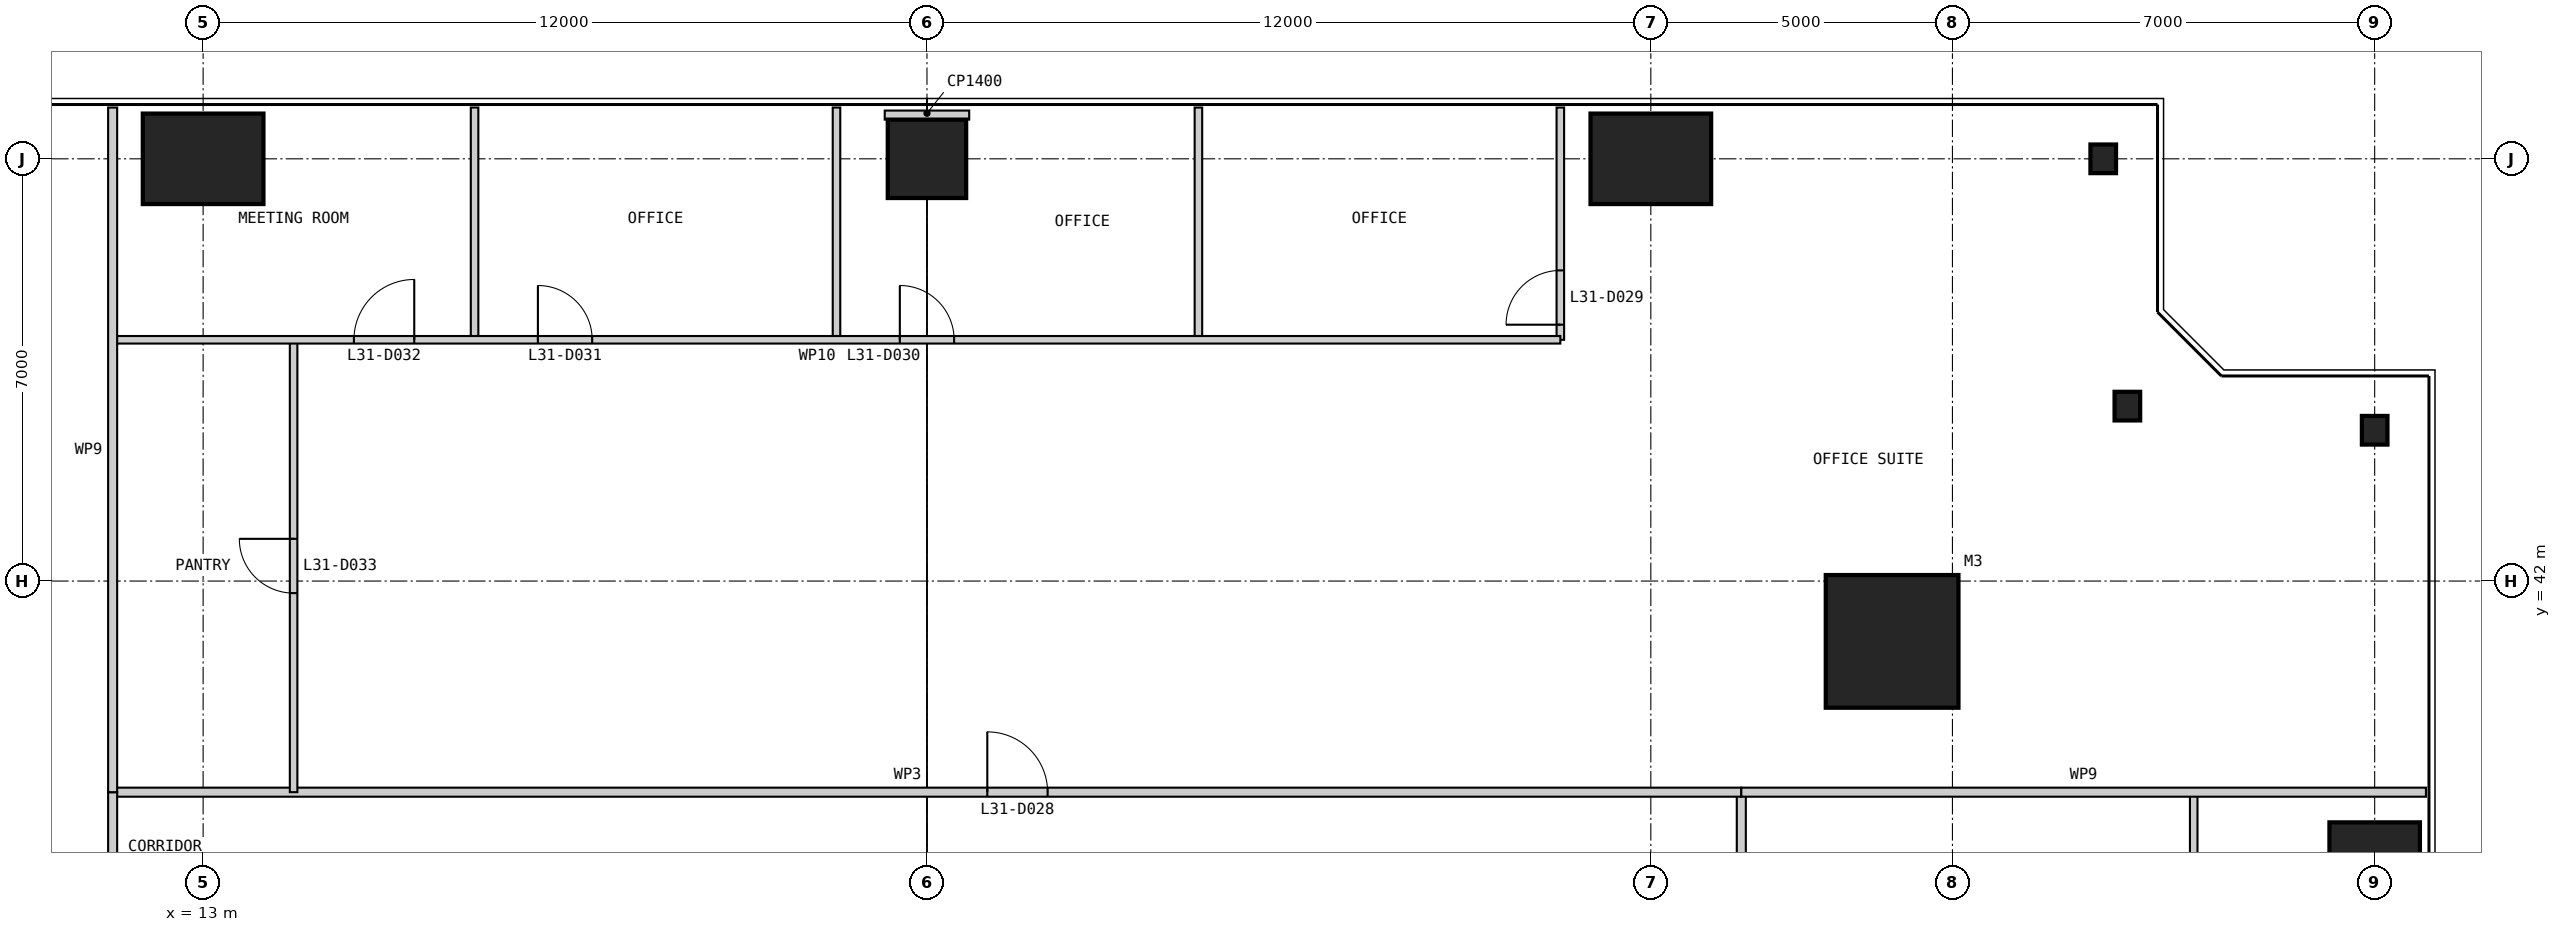
"""IFC4 building model, lengths in metres.
Left out: names, types, materials, properties, quantities, classifications, styles, units other than length and angle.
Written with IfcOpenShell. Run it as: python <this file> out.ifc"""

import sys

from ifc_helpers import new_model, si_unit, direction, frame, frame_2d, origin, origin_2d, place, context, subcontext, project, spatial, rectangle, i_section, extrude, element, fill, save


model = new_model("IFC4")
c1 = context("Model", 3, precision=1e-05, world=origin(), true_north=direction((0.0, 1.0)))
c2 = subcontext(c1, "Body", "Model", "MODEL_VIEW")
j1 = project(units=[si_unit("LENGTHUNIT", "METRE"), si_unit("PLANEANGLEUNIT", "RADIAN")], contexts=[c1])
p1 = place(None, origin())
s1 = spatial("IfcSite", under=j1, at=p1, CompositionType="ELEMENT")
p2 = place(p1, origin())
s2 = spatial("IfcBuilding", under=s1, at=p2, CompositionType="ELEMENT")
p3 = place(p2, frame((0.0, 0.0, 134.4)))
s3 = spatial("IfcBuildingStorey", under=s2, at=p3, CompositionType="ELEMENT", Elevation=134.4)
p4 = place(p3, frame((41.0, 41.0, 0.0), z_axis=(0.0, 0.0, 1.0), x_axis=(1.0, 0.0, 0.0)))
e1 = element("IfcColumn", 1, at=p4, inside=s3, PredefinedType="COLUMN", context=c2, shape_type="SweptSolid", body=[
    extrude(rectangle(XDim=2.2, YDim=2.2, at=origin_2d()), origin(), (0.0, 0.0, 1.0), 4.0),
])
p5 = place(p3, frame((49.0, 37.0, 0.0), z_axis=(0.0, 0.0, 1.0), x_axis=(1.0, 0.0, 0.0)))
e2 = element("IfcColumn", 2, at=p5, inside=s3, PredefinedType="COLUMN", context=c2, shape_type="SweptSolid", body=[
    extrude(rectangle(XDim=1.5, YDim=2.0, at=origin_2d()), origin(), (0.0, 0.0, 1.0), 4.0),
])
for number, where, z_axis, x_axis in (
    (3, (49.0, 44.5, 0.0), (0.0, 0.0, 1.0), (1.0, 0.0, 0.0)),
    (4, (44.9, 44.9, 0.0), (0.0, 0.0, 1.0), (1.0, 0.0, 0.0)),
    (5, (44.5, 49.0, 0.0), (0.0, 0.0, 1.0), (1.0, 0.0, 0.0)),
):
    element("IfcColumn", number, at=place(p3, frame(where, z_axis=z_axis, x_axis=x_axis)), inside=s3, PredefinedType="COLUMN", context=c2, shape_type="SweptSolid", body=[
        extrude(i_section(OverallWidth=0.424, OverallDepth=0.475, WebThickness=0.048, FlangeThickness=0.077, at=origin_2d()), origin(), (0.0, 0.0, 1.0), 4.0),
    ])
p6 = place(p3, frame((37.0, 49.0, 0.0), z_axis=(0.0, 0.0, 1.0), x_axis=(1.0, 0.0, 0.0)))
e6 = element("IfcColumn", 6, at=p6, inside=s3, PredefinedType="COLUMN", context=c2, shape_type="SweptSolid", body=[
    extrude(rectangle(XDim=2.0, YDim=1.5, at=origin_2d()), origin(), (0.0, 0.0, 1.0), 4.0),
])
p7 = place(p3, frame((25.0, 49.0, 0.0), z_axis=(0.0, 0.0, 1.0), x_axis=(1.0, 0.0, 0.0)))
e7 = element("IfcColumn", 7, at=p7, inside=s3, PredefinedType="COLUMN", context=c2, shape_type="SweptSolid", body=[
    extrude(rectangle(XDim=1.3, YDim=1.3, at=origin_2d()), origin(), (0.0, 0.0, 1.0), 4.0),
])
p8 = place(p3, frame((13.0, 49.0, 0.0), z_axis=(0.0, 0.0, 1.0), x_axis=(1.0, 0.0, 0.0)))
e8 = element("IfcColumn", 8, at=p8, inside=s3, PredefinedType="COLUMN", context=c2, shape_type="SweptSolid", body=[
    extrude(rectangle(XDim=2.0, YDim=1.5, at=origin_2d()), origin(), (0.0, 0.0, 1.0), 4.0),
])
p9 = place(p3, frame((38.5, 11.5, 0.0), z_axis=(0.0, 0.0, 1.0), x_axis=(0.0, 1.0, 0.0)))
e9 = element("IfcWall", 9, at=p9, inside=s3, PredefinedType="PARTITIONING", context=c2, shape_type="SweptSolid", body=[
    extrude(rectangle(XDim=27.0, YDim=0.15, at=frame_2d((13.5, 0.0))), origin(), (0.0, 0.0, 1.0), 3.85),
])
p10 = place(p9, frame((13.0, 0.0, 0.0)))
e10 = element("IfcOpeningElement", 10, at=p10, cuts=e9, PredefinedType="OPENING", context=c2, shape_type="SweptSolid", body=[
    extrude(rectangle(XDim=1.0, YDim=2.2, at=frame_2d((0.5, 1.1))), frame((0.0, 0.085, 0.0), z_axis=(0.0, -1.0, 0.0), x_axis=(1.0, 0.0, 0.0)), (0.0, 0.0, 1.0), 0.17),
])
p11 = place(p3, frame((46.0, 14.5, 0.0), z_axis=(0.0, 0.0, 1.0), x_axis=(0.0, 1.0, 0.0)))
e11 = element("IfcWall", 11, at=p11, inside=s3, PredefinedType="PARTITIONING", context=c2, shape_type="SweptSolid", body=[
    extrude(rectangle(XDim=24.0, YDim=0.125, at=frame_2d((12.0, 0.0))), origin(), (0.0, 0.0, 1.0), 3.238),
])
p12 = place(p11, frame((4.05, 0.0, 0.0)))
e12 = element("IfcOpeningElement", 12, at=p12, cuts=e11, PredefinedType="OPENING", context=c2, shape_type="SweptSolid", body=[
    extrude(rectangle(XDim=0.9, YDim=2.2, at=frame_2d((0.45, 1.1))), frame((0.0, 0.073, 0.0), z_axis=(0.0, -1.0, 0.0), x_axis=(1.0, 0.0, 0.0)), (0.0, 0.0, 1.0), 0.145),
])
p13 = place(p11, frame((10.05, 0.0, 0.0)))
e13 = element("IfcOpeningElement", 13, at=p13, cuts=e11, PredefinedType="OPENING", context=c2, shape_type="SweptSolid", body=[
    extrude(rectangle(XDim=0.9, YDim=2.2, at=frame_2d((0.45, 1.1))), frame((0.0, 0.073, 0.0), z_axis=(0.0, -1.0, 0.0), x_axis=(1.0, 0.0, 0.0)), (0.0, 0.0, 1.0), 0.145),
])
p14 = place(p11, frame((16.05, 0.0, 0.0)))
e14 = element("IfcOpeningElement", 14, at=p14, cuts=e11, PredefinedType="OPENING", context=c2, shape_type="SweptSolid", body=[
    extrude(rectangle(XDim=0.9, YDim=2.2, at=frame_2d((0.45, 1.1))), frame((0.0, 0.073, 0.0), z_axis=(0.0, -1.0, 0.0), x_axis=(1.0, 0.0, 0.0)), (0.0, 0.0, 1.0), 0.145),
])
p15 = place(p11, frame((19.05, 0.0, 0.0)))
e15 = element("IfcOpeningElement", 15, at=p15, cuts=e11, PredefinedType="OPENING", context=c2, shape_type="SweptSolid", body=[
    extrude(rectangle(XDim=0.9, YDim=2.2, at=frame_2d((0.45, 1.1))), frame((0.0, 0.073, 0.0), z_axis=(0.0, -1.0, 0.0), x_axis=(1.0, 0.0, 0.0)), (0.0, 0.0, 1.0), 0.145),
])
p16 = place(p3, frame((38.5, 38.5, 0.0), z_axis=(0.0, 0.0, 1.0), x_axis=(-1.0, 0.0, 0.0)))
e16 = element("IfcWall", 16, at=p16, inside=s3, PredefinedType="PARTITIONING", context=c2, shape_type="SweptSolid", body=[
    extrude(rectangle(XDim=27.0, YDim=0.15, at=frame_2d((13.5, 0.0))), origin(), (0.0, 0.0, 1.0), 3.85),
])
p17 = place(p16, frame((11.5, 0.0, 0.0)))
e17 = element("IfcOpeningElement", 17, at=p17, cuts=e16, PredefinedType="OPENING", context=c2, shape_type="SweptSolid", body=[
    extrude(rectangle(XDim=1.0, YDim=2.2, at=frame_2d((0.5, 1.1))), frame((0.0, 0.085, 0.0), z_axis=(0.0, -1.0, 0.0), x_axis=(1.0, 0.0, 0.0)), (0.0, 0.0, 1.0), 0.17),
])
p18 = place(p3, frame((49.85, 38.5, 0.0), z_axis=(0.0, 0.0, 1.0), x_axis=(-1.0, 0.0, 0.0)))
e18 = element("IfcWall", 18, at=p18, inside=s3, PredefinedType="PARTITIONING", context=c2, shape_type="SweptSolid", body=[
    extrude(rectangle(XDim=11.35, YDim=0.15, at=frame_2d((5.675, 0.0))), origin(), (0.0, 0.0, 1.0), 3.85),
])
p19 = place(p3, frame((35.5, 49.85, 0.0), z_axis=(0.0, 0.0, 1.0), x_axis=(0.0, -1.0, 0.0)))
e19 = element("IfcWall", 19, at=p19, inside=s3, PredefinedType="PARTITIONING", context=c2, shape_type="SweptSolid", body=[
    extrude(rectangle(XDim=3.85, YDim=0.125, at=frame_2d((1.925, 0.0))), origin(), (0.0, 0.0, 1.0), 3.85),
])
p20 = place(p19, frame((2.7, 0.0, 0.0)))
e20 = element("IfcOpeningElement", 20, at=p20, cuts=e19, PredefinedType="OPENING", context=c2, shape_type="SweptSolid", body=[
    extrude(rectangle(XDim=0.9, YDim=2.2, at=frame_2d((0.45, 1.1))), frame((0.0, 0.073, 0.0), z_axis=(0.0, -1.0, 0.0), x_axis=(1.0, 0.0, 0.0)), (0.0, 0.0, 1.0), 0.145),
])
for number, where, z_axis, x_axis in (
    (21, (29.5, 49.85, 0.0), (0.0, 0.0, 1.0), (0.0, -1.0, 0.0)),
    (22, (23.5, 49.85, 0.0), (0.0, 0.0, 1.0), (0.0, -1.0, 0.0)),
    (23, (17.5, 49.85, 0.0), (0.0, 0.0, 1.0), (0.0, -1.0, 0.0)),
):
    element("IfcWall", number, at=place(p3, frame(where, z_axis=z_axis, x_axis=x_axis)), inside=s3, PredefinedType="PARTITIONING", context=c2, shape_type="SweptSolid", body=[
        extrude(rectangle(XDim=3.85, YDim=0.125, at=frame_2d((1.925, 0.0))), origin(), (0.0, 0.0, 1.0), 3.85),
    ])
p21 = place(p3, frame((14.5, 46.0, 0.0), z_axis=(0.0, 0.0, 1.0), x_axis=(0.0, -1.0, 0.0)))
e24 = element("IfcWall", 24, at=p21, inside=s3, PredefinedType="PARTITIONING", context=c2, shape_type="SweptSolid", body=[
    extrude(rectangle(XDim=7.5, YDim=0.125, at=frame_2d((3.75, 0.0))), origin(), (0.0, 0.0, 1.0), 3.85),
])
p22 = place(p21, frame((3.3, 0.0, 0.0)))
e25 = element("IfcOpeningElement", 25, at=p22, cuts=e24, PredefinedType="OPENING", context=c2, shape_type="SweptSolid", body=[
    extrude(rectangle(XDim=0.9, YDim=2.2, at=frame_2d((0.45, 1.1))), frame((0.0, 0.073, 0.0), z_axis=(0.0, -1.0, 0.0), x_axis=(1.0, 0.0, 0.0)), (0.0, 0.0, 1.0), 0.145),
])
p23 = place(p3, frame((35.5, 46.0, 0.0), z_axis=(0.0, 0.0, 1.0), x_axis=(-1.0, 0.0, 0.0)))
e26 = element("IfcWall", 26, at=p23, inside=s3, PredefinedType="PARTITIONING", context=c2, shape_type="SweptSolid", body=[
    extrude(rectangle(XDim=24.0, YDim=0.125, at=frame_2d((12.0, 0.0))), origin(), (0.0, 0.0, 1.0), 3.85),
])
p24 = place(p23, frame((10.05, 0.0, 0.0)))
e27 = element("IfcOpeningElement", 27, at=p24, cuts=e26, PredefinedType="OPENING", context=c2, shape_type="SweptSolid", body=[
    extrude(rectangle(XDim=0.9, YDim=2.2, at=frame_2d((0.45, 1.1))), frame((0.0, 0.073, 0.0), z_axis=(0.0, -1.0, 0.0), x_axis=(1.0, 0.0, 0.0)), (0.0, 0.0, 1.0), 0.145),
])
p25 = place(p23, frame((16.05, 0.0, 0.0)))
e28 = element("IfcOpeningElement", 28, at=p25, cuts=e26, PredefinedType="OPENING", context=c2, shape_type="SweptSolid", body=[
    extrude(rectangle(XDim=0.9, YDim=2.2, at=frame_2d((0.45, 1.1))), frame((0.0, 0.073, 0.0), z_axis=(0.0, -1.0, 0.0), x_axis=(1.0, 0.0, 0.0)), (0.0, 0.0, 1.0), 0.145),
])
p26 = place(p23, frame((19.0, 0.0, 0.0)))
e29 = element("IfcOpeningElement", 29, at=p26, cuts=e26, PredefinedType="OPENING", context=c2, shape_type="SweptSolid", body=[
    extrude(rectangle(XDim=1.0, YDim=2.2, at=frame_2d((0.5, 1.1))), frame((0.0, 0.073, 0.0), z_axis=(0.0, -1.0, 0.0), x_axis=(1.0, 0.0, 0.0)), (0.0, 0.0, 1.0), 0.145),
])
p27 = place(p3, frame((11.5, 38.5, 0.0), z_axis=(0.0, 0.0, 1.0), x_axis=(0.0, -1.0, 0.0)))
e30 = element("IfcWall", 30, at=p27, inside=s3, PredefinedType="PARTITIONING", context=c2, shape_type="SweptSolid", body=[
    extrude(rectangle(XDim=27.0, YDim=0.15, at=frame_2d((13.5, 0.0))), origin(), (0.0, 0.0, 1.0), 3.85),
])
p28 = place(p27, frame((2.5, 0.0, 0.0)))
e31 = element("IfcOpeningElement", 31, at=p28, cuts=e30, PredefinedType="OPENING", context=c2, shape_type="SweptSolid", body=[
    extrude(rectangle(XDim=1.0, YDim=2.2, at=frame_2d((0.5, 1.1))), frame((0.0, 0.085, 0.0), z_axis=(0.0, -1.0, 0.0), x_axis=(1.0, 0.0, 0.0)), (0.0, 0.0, 1.0), 0.17),
])
p29 = place(p27, frame((16.0, 0.0, 0.0)))
e32 = element("IfcOpeningElement", 32, at=p29, cuts=e30, PredefinedType="OPENING", context=c2, shape_type="SweptSolid", body=[
    extrude(rectangle(XDim=1.0, YDim=2.2, at=frame_2d((0.5, 1.1))), frame((0.0, 0.085, 0.0), z_axis=(0.0, -1.0, 0.0), x_axis=(1.0, 0.0, 0.0)), (0.0, 0.0, 1.0), 0.17),
])
p30 = place(p3, frame((11.5, 49.85, 0.0), z_axis=(0.0, 0.0, 1.0), x_axis=(0.0, -1.0, 0.0)))
e33 = element("IfcWall", 33, at=p30, inside=s3, PredefinedType="PARTITIONING", context=c2, shape_type="SweptSolid", body=[
    extrude(rectangle(XDim=11.35, YDim=0.15, at=frame_2d((5.675, 0.0))), origin(), (0.0, 0.0, 1.0), 3.85),
])
p31 = place(p3, frame((25.0, 49.8, 0.0), z_axis=(0.0, 0.0, 1.0), x_axis=(0.0, -1.0, 0.0)))
e34 = element("IfcWall", 34, at=p31, inside=s3, PredefinedType="PARTITIONING", context=c2, shape_type="SweptSolid", body=[
    extrude(rectangle(XDim=0.15, YDim=1.4, at=frame_2d((0.075, 0.0))), origin(), (0.0, 0.0, 1.0), 3.85),
])
p32 = place(p17, frame((1.0, 0.0, 0.0), z_axis=(0.0, 0.0, 1.0), x_axis=(-1.0, 0.0, 0.0)))
e35 = element("IfcDoor", 35, at=p32, inside=s3, OperationType="SINGLE_SWING_LEFT", PredefinedType="DOOR", context=c2, shape_type="SweptSolid", body=[
    extrude(rectangle(XDim=1.0, YDim=2.2, at=frame_2d((0.5, 1.1))), frame((0.0, 0.025, 0.0), z_axis=(0.0, -1.0, 0.0), x_axis=(1.0, 0.0, 0.0)), (0.0, 0.0, 1.0), 0.05),
])
fill(e17, e35)
p33 = place(p20, frame((0.9, 0.0, 0.0), z_axis=(0.0, 0.0, 1.0), x_axis=(-1.0, 0.0, 0.0)))
e36 = element("IfcDoor", 36, at=p33, inside=s3, OperationType="SINGLE_SWING_LEFT", PredefinedType="DOOR", context=c2, shape_type="SweptSolid", body=[
    extrude(rectangle(XDim=0.9, YDim=2.2, at=frame_2d((0.45, 1.1))), frame((0.0, 0.025, 0.0), z_axis=(0.0, -1.0, 0.0), x_axis=(1.0, 0.0, 0.0)), (0.0, 0.0, 1.0), 0.05),
])
fill(e20, e36)
p34 = place(p24, frame((0.9, 0.0, 0.0), z_axis=(0.0, 0.0, 1.0), x_axis=(-1.0, 0.0, 0.0)))
e37 = element("IfcDoor", 37, at=p34, inside=s3, OperationType="SINGLE_SWING_LEFT", PredefinedType="DOOR", context=c2, shape_type="SweptSolid", body=[
    extrude(rectangle(XDim=0.9, YDim=2.2, at=frame_2d((0.45, 1.1))), frame((0.0, 0.025, 0.0), z_axis=(0.0, -1.0, 0.0), x_axis=(1.0, 0.0, 0.0)), (0.0, 0.0, 1.0), 0.05),
])
fill(e27, e37)
p35 = place(p25, frame((0.9, 0.0, 0.0), z_axis=(0.0, 0.0, 1.0), x_axis=(-1.0, 0.0, 0.0)))
e38 = element("IfcDoor", 38, at=p35, inside=s3, OperationType="SINGLE_SWING_LEFT", PredefinedType="DOOR", context=c2, shape_type="SweptSolid", body=[
    extrude(rectangle(XDim=0.9, YDim=2.2, at=frame_2d((0.45, 1.1))), frame((0.0, 0.025, 0.0), z_axis=(0.0, -1.0, 0.0), x_axis=(1.0, 0.0, 0.0)), (0.0, 0.0, 1.0), 0.05),
])
fill(e28, e38)
p36 = place(p26, frame((1.0, 0.0, 0.0), z_axis=(0.0, 0.0, 1.0), x_axis=(-1.0, 0.0, 0.0)))
e39 = element("IfcDoor", 39, at=p36, inside=s3, OperationType="SINGLE_SWING_RIGHT", PredefinedType="DOOR", context=c2, shape_type="SweptSolid", body=[
    extrude(rectangle(XDim=1.0, YDim=2.2, at=frame_2d((0.5, 1.1))), frame((0.0, 0.025, 0.0), z_axis=(0.0, -1.0, 0.0), x_axis=(1.0, 0.0, 0.0)), (0.0, 0.0, 1.0), 0.05),
])
fill(e29, e39)
p37 = place(p22, frame((0.9, 0.0, 0.0), z_axis=(0.0, 0.0, 1.0), x_axis=(-1.0, 0.0, 0.0)))
e40 = element("IfcDoor", 40, at=p37, inside=s3, OperationType="SINGLE_SWING_RIGHT", PredefinedType="DOOR", context=c2, shape_type="SweptSolid", body=[
    extrude(rectangle(XDim=0.9, YDim=2.2, at=frame_2d((0.45, 1.1))), frame((0.0, 0.025, 0.0), z_axis=(0.0, -1.0, 0.0), x_axis=(1.0, 0.0, 0.0)), (0.0, 0.0, 1.0), 0.05),
])
fill(e25, e40)
save(model, sys.argv[1])
